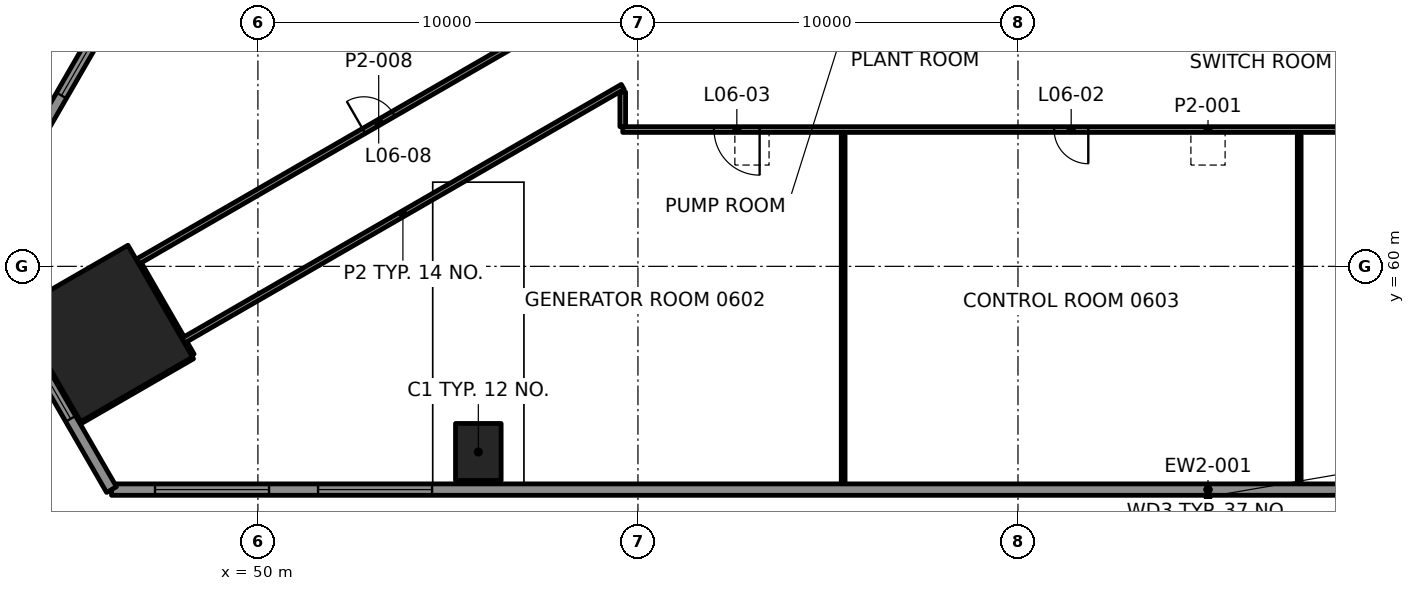
"""IFC4 building model, lengths in metres.
Left out: names, types, materials, properties, quantities, classifications, styles, units other than length and angle.
Written with IfcOpenShell. Run it as: python <this file> out.ifc"""

import sys

from ifc_helpers import new_model, si_unit, direction, frame, frame_2d, origin, origin_2d, place, context, subcontext, project, spatial, rectangle, extrude, element, fill, save


model = new_model("IFC4")
c1 = context("Model", 3, precision=1e-05, world=origin(), true_north=direction((0.0, 1.0)))
c2 = subcontext(c1, "Body", "Model", "MODEL_VIEW")
j1 = project(units=[si_unit("LENGTHUNIT", "METRE"), si_unit("PLANEANGLEUNIT", "RADIAN")], contexts=[c1])
p1 = place(None, origin())
s1 = spatial("IfcSite", under=j1, at=p1, CompositionType="ELEMENT")
p2 = place(p1, origin())
s2 = spatial("IfcBuilding", under=s1, at=p2, CompositionType="ELEMENT")
p3 = place(p2, frame((0.0, 0.0, 31.0)))
s3 = spatial("IfcBuildingStorey", under=s2, at=p3, CompositionType="ELEMENT", Elevation=31.0)
p4 = place(p3, frame((45.959, 58.233, 0.0), z_axis=(0.0, 0.0, 1.0), x_axis=(0.5, -0.866025403784, 0.0)))
e1 = element("IfcColumn", 1, at=p4, inside=s3, PredefinedType="COLUMN", context=c2, shape_type="SweptSolid", body=[
    extrude(rectangle(XDim=3.4, YDim=3.4, at=origin_2d()), origin(), (0.0, 0.0, 1.0), 4.5),
])
p5 = place(p3, frame((55.8, 55.115, -0.0), z_axis=(0.0, 0.0, 1.0), x_axis=(1.0, 0.0, 0.0)))
e2 = element("IfcColumn", 2, at=p5, inside=s3, PredefinedType="COLUMN", context=c2, shape_type="SweptSolid", body=[
    extrude(rectangle(XDim=1.2, YDim=1.5, at=origin_2d()), origin(), (0.0, 0.0, 1.0), 4.5),
])
p6 = place(p3, frame((90.4, 63.6, 0.0), z_axis=(0.0, 0.0, 1.0), x_axis=(-1.0, 0.0, 0.0)))
e3 = element("IfcWall", 3, at=p6, inside=s3, PredefinedType="PARTITIONING", context=c2, shape_type="SweptSolid", body=[
    extrude(rectangle(XDim=30.799, YDim=0.15, at=frame_2d((15.4, 0.0))), origin(), (0.0, 0.0, 1.0), 3.45),
])
p7 = place(p6, frame((6.001, 0.0, 0.0)))
e4 = element("IfcOpeningElement", 4, at=p7, cuts=e3, PredefinedType="OPENING", context=c2, shape_type="SweptSolid", body=[
    extrude(rectangle(XDim=1.2, YDim=2.1, at=frame_2d((0.6, 1.05))), frame((0.0, 0.085, 0.0), z_axis=(0.0, -1.0, 0.0), x_axis=(1.0, 0.0, 0.0)), (0.0, 0.0, 1.0), 0.17),
])
p8 = place(p6, frame((18.55, 0.0, 0.0)))
e5 = element("IfcOpeningElement", 5, at=p8, cuts=e3, PredefinedType="OPENING", context=c2, shape_type="SweptSolid", body=[
    extrude(rectangle(XDim=0.9, YDim=2.1, at=frame_2d((0.45, 1.05))), frame((0.0, 0.085, 0.0), z_axis=(0.0, -1.0, 0.0), x_axis=(1.0, 0.0, 0.0)), (0.0, 0.0, 1.0), 0.17),
])
p9 = place(p6, frame((27.198, 0.0, 0.0)))
e6 = element("IfcOpeningElement", 6, at=p9, cuts=e3, PredefinedType="OPENING", context=c2, shape_type="SweptSolid", body=[
    extrude(rectangle(XDim=1.2, YDim=2.1, at=frame_2d((0.6, 1.05))), frame((0.0, 0.085, 0.0), z_axis=(0.0, -1.0, 0.0), x_axis=(1.0, 0.0, 0.0)), (0.0, 0.0, 1.0), 0.17),
])
p10 = place(p3, frame((45.198, 55.831, 0.0), z_axis=(0.0, 0.0, 1.0), x_axis=(0.866014251095, 0.500019316528, 0.0)))
e7 = element("IfcWall", 7, at=p10, inside=s3, PredefinedType="PARTITIONING", context=c2, shape_type="SweptSolid", body=[
    extrude(rectangle(XDim=3.559, YDim=0.1, at=frame_2d((1.78, 0.0))), origin(), (0.0, 0.0, 1.0), 3.45),
])
p11 = place(p3, frame((48.031, 58.044, 0.0), z_axis=(0.0, 0.0, 1.0), x_axis=(0.866027935033, 0.499995615723, 0.0)))
e8 = element("IfcWall", 8, at=p11, inside=s3, PredefinedType="PARTITIONING", context=c2, shape_type="SweptSolid", body=[
    extrude(rectangle(XDim=13.358, YDim=0.15, at=frame_2d((6.679, 0.0))), origin(), (0.0, 0.0, 1.0), 3.297),
])
p12 = place(p3, frame((46.832, 60.123, 0.0), z_axis=(0.0, 0.0, 1.0), x_axis=(0.866022484069, 0.500005057062, 0.0)))
e9 = element("IfcWall", 9, at=p12, inside=s3, PredefinedType="PARTITIONING", context=c2, shape_type="SweptSolid", body=[
    extrude(rectangle(XDim=14.657, YDim=0.15, at=frame_2d((7.329, 0.0))), origin(), (0.0, 0.0, 1.0), 3.45),
])
p13 = place(p12, frame((6.879, 0.0, 0.0)))
e10 = element("IfcOpeningElement", 10, at=p13, cuts=e9, PredefinedType="OPENING", context=c2, shape_type="SweptSolid", body=[
    extrude(rectangle(XDim=0.9, YDim=2.1, at=frame_2d((0.45, 1.05))), frame((0.0, 0.085, 0.0), z_axis=(0.0, -1.0, 0.0), x_axis=(1.0, 0.0, 0.0)), (0.0, 0.0, 1.0), 0.17),
])
for number, where, z_axis, x_axis in (
    (11, (77.4, 54.155, 0.0), (0.0, 0.0, 1.0), (0.0, 1.0, 0.0)),
    (12, (65.4, 54.155, 0.0), (0.0, 0.0, 1.0), (0.0, 1.0, 0.0)),
):
    element("IfcWall", number, at=place(p3, frame(where, z_axis=z_axis, x_axis=x_axis)), inside=s3, PredefinedType="PARTITIONING", context=c2, shape_type="SweptSolid", body=[
        extrude(rectangle(XDim=9.37, YDim=0.1, at=frame_2d((4.685, 0.0))), origin(), (0.0, 0.0, 1.0), 3.45),
    ])
p14 = place(p3, frame((59.6, 63.676, 0.0), z_axis=(0.0, 0.0, 1.0), x_axis=(0.0, 1.0, 0.0)))
e13 = element("IfcWall", 13, at=p14, inside=s3, PredefinedType="PARTITIONING", context=c2, shape_type="SweptSolid", body=[
    extrude(rectangle(XDim=0.911, YDim=0.15, at=frame_2d((0.456, 0.0))), origin(), (0.0, 0.0, 1.0), 3.45),
])
p15 = place(p3, frame((48.256, 57.655, 0.0), z_axis=(0.0, 0.0, 1.0), x_axis=(-0.499854089722, 0.866109628736, 0.0)))
e14 = element("IfcWall", 14, at=p15, inside=s3, PredefinedType="PARTITIONING", context=c2, shape_type="SweptSolid", body=[
    extrude(rectangle(XDim=0.375, YDim=0.15, at=frame_2d((0.187, 0.0))), origin(), (0.0, 0.0, 1.0), 3.45),
])
p16 = place(p3, frame((47.993, 58.109, 0.0), z_axis=(0.0, 0.0, 1.0), x_axis=(-0.499944821793, 0.866057258594, 0.0)))
e15 = element("IfcWall", 15, at=p16, inside=s3, PredefinedType="PARTITIONING", context=c2, shape_type="SweptSolid", body=[
    extrude(rectangle(XDim=2.249, YDim=0.15, at=frame_2d((1.125, 0.0))), origin(), (0.0, 0.0, 1.0), 3.297),
])
p17 = place(p3, frame((46.148, 54.125, 0.0), z_axis=(0.0, 0.0, 1.0), x_axis=(1.0, 0.0, 0.0)))
e16 = element("IfcWall", 16, at=p17, inside=s3, PredefinedType="SOLIDWALL", context=c2, shape_type="SweptSolid", body=[
    extrude(rectangle(XDim=57.704, YDim=0.3, at=frame_2d((28.852, 0.0))), origin(), (0.0, 0.0, 1.0), 4.05),
])
p18 = place(p17, frame((1.145, 0.0, 0.8)))
e17 = element("IfcOpeningElement", 17, at=p18, cuts=e16, PredefinedType="OPENING", context=c2, shape_type="SweptSolid", body=[
    extrude(rectangle(XDim=3.0, YDim=2.4, at=frame_2d((1.5, 1.2))), frame((0.0, 0.16, 0.0), z_axis=(0.0, -1.0, 0.0), x_axis=(1.0, 0.0, 0.0)), (0.0, 0.0, 1.0), 0.32),
])
p19 = place(p17, frame((5.435, 0.0, 0.8)))
e18 = element("IfcOpeningElement", 18, at=p19, cuts=e16, PredefinedType="OPENING", context=c2, shape_type="SweptSolid", body=[
    extrude(rectangle(XDim=3.0, YDim=2.4, at=frame_2d((1.5, 1.2))), frame((0.0, 0.16, 0.0), z_axis=(0.0, -1.0, 0.0), x_axis=(1.0, 0.0, 0.0)), (0.0, 0.0, 1.0), 0.32),
])
p20 = place(p17, frame((49.269, 0.0, 0.8)))
e19 = element("IfcOpeningElement", 19, at=p20, cuts=e16, PredefinedType="OPENING", context=c2, shape_type="SweptSolid", body=[
    extrude(rectangle(XDim=3.0, YDim=2.4, at=frame_2d((1.5, 1.2))), frame((0.0, 0.16, 0.0), z_axis=(0.0, -1.0, 0.0), x_axis=(1.0, 0.0, 0.0)), (0.0, 0.0, 1.0), 0.32),
])
p21 = place(p17, frame((53.559, 0.0, 0.8)))
e20 = element("IfcOpeningElement", 20, at=p21, cuts=e16, PredefinedType="OPENING", context=c2, shape_type="SweptSolid", body=[
    extrude(rectangle(XDim=3.0, YDim=2.4, at=frame_2d((1.5, 1.2))), frame((0.0, 0.16, 0.0), z_axis=(0.0, -1.0, 0.0), x_axis=(1.0, 0.0, 0.0)), (0.0, 0.0, 1.0), 0.32),
])
p22 = place(p3, frame((71.348, 110.424, 0.0), z_axis=(0.0, 0.0, 1.0), x_axis=(-0.500000550228, -0.86602508611, 0.0)))
e21 = element("IfcWall", 21, at=p22, inside=s3, PredefinedType="SOLIDWALL", context=c2, shape_type="SweptSolid", body=[
    extrude(rectangle(XDim=57.704, YDim=0.3, at=frame_2d((28.852, 0.0))), origin(), (0.0, 0.0, 1.0), 4.05),
])
p23 = place(p22, frame((0.89, 0.0, 0.8)))
e22 = element("IfcOpeningElement", 22, at=p23, cuts=e21, PredefinedType="OPENING", context=c2, shape_type="SweptSolid", body=[
    extrude(rectangle(XDim=3.0, YDim=2.4, at=frame_2d((1.5, 1.2))), frame((0.0, 0.16, 0.0), z_axis=(0.0, -1.0, 0.0), x_axis=(1.0, 0.0, 0.0)), (0.0, 0.0, 1.0), 0.32),
])
p24 = place(p22, frame((4.67, 0.0, 0.8)))
e23 = element("IfcOpeningElement", 23, at=p24, cuts=e21, PredefinedType="OPENING", context=c2, shape_type="SweptSolid", body=[
    extrude(rectangle(XDim=3.0, YDim=2.4, at=frame_2d((1.5, 1.2))), frame((0.0, 0.16, 0.0), z_axis=(0.0, -1.0, 0.0), x_axis=(1.0, 0.0, 0.0)), (0.0, 0.0, 1.0), 0.32),
])
p25 = place(p22, frame((8.451, 0.0, 0.8)))
e24 = element("IfcOpeningElement", 24, at=p25, cuts=e21, PredefinedType="OPENING", context=c2, shape_type="SweptSolid", body=[
    extrude(rectangle(XDim=3.0, YDim=2.4, at=frame_2d((1.5, 1.2))), frame((0.0, 0.16, 0.0), z_axis=(0.0, -1.0, 0.0), x_axis=(1.0, 0.0, 0.0)), (0.0, 0.0, 1.0), 0.32),
])
p26 = place(p22, frame((12.231, 0.0, 0.8)))
e25 = element("IfcOpeningElement", 25, at=p26, cuts=e21, PredefinedType="OPENING", context=c2, shape_type="SweptSolid", body=[
    extrude(rectangle(XDim=3.0, YDim=2.4, at=frame_2d((1.5, 1.2))), frame((0.0, 0.16, 0.0), z_axis=(0.0, -1.0, 0.0), x_axis=(1.0, 0.0, 0.0)), (0.0, 0.0, 1.0), 0.32),
])
p27 = place(p22, frame((16.011, 0.0, 0.8)))
e26 = element("IfcOpeningElement", 26, at=p27, cuts=e21, PredefinedType="OPENING", context=c2, shape_type="SweptSolid", body=[
    extrude(rectangle(XDim=3.0, YDim=2.4, at=frame_2d((1.5, 1.2))), frame((0.0, 0.16, 0.0), z_axis=(0.0, -1.0, 0.0), x_axis=(1.0, 0.0, 0.0)), (0.0, 0.0, 1.0), 0.32),
])
p28 = place(p22, frame((19.792, 0.0, 0.8)))
e27 = element("IfcOpeningElement", 27, at=p28, cuts=e21, PredefinedType="OPENING", context=c2, shape_type="SweptSolid", body=[
    extrude(rectangle(XDim=3.0, YDim=2.4, at=frame_2d((1.5, 1.2))), frame((0.0, 0.16, 0.0), z_axis=(0.0, -1.0, 0.0), x_axis=(1.0, 0.0, 0.0)), (0.0, 0.0, 1.0), 0.32),
])
p29 = place(p22, frame((23.572, 0.0, 0.8)))
e28 = element("IfcOpeningElement", 28, at=p29, cuts=e21, PredefinedType="OPENING", context=c2, shape_type="SweptSolid", body=[
    extrude(rectangle(XDim=3.0, YDim=2.4, at=frame_2d((1.5, 1.2))), frame((0.0, 0.16, 0.0), z_axis=(0.0, -1.0, 0.0), x_axis=(1.0, 0.0, 0.0)), (0.0, 0.0, 1.0), 0.32),
])
p30 = place(p22, frame((27.352, 0.0, 0.8)))
e29 = element("IfcOpeningElement", 29, at=p30, cuts=e21, PredefinedType="OPENING", context=c2, shape_type="SweptSolid", body=[
    extrude(rectangle(XDim=3.0, YDim=2.4, at=frame_2d((1.5, 1.2))), frame((0.0, 0.16, 0.0), z_axis=(0.0, -1.0, 0.0), x_axis=(1.0, 0.0, 0.0)), (0.0, 0.0, 1.0), 0.32),
])
p31 = place(p22, frame((31.132, 0.0, 0.8)))
e30 = element("IfcOpeningElement", 30, at=p31, cuts=e21, PredefinedType="OPENING", context=c2, shape_type="SweptSolid", body=[
    extrude(rectangle(XDim=3.0, YDim=2.4, at=frame_2d((1.5, 1.2))), frame((0.0, 0.16, 0.0), z_axis=(0.0, -1.0, 0.0), x_axis=(1.0, 0.0, 0.0)), (0.0, 0.0, 1.0), 0.32),
])
p32 = place(p22, frame((34.913, 0.0, 0.8)))
e31 = element("IfcOpeningElement", 31, at=p32, cuts=e21, PredefinedType="OPENING", context=c2, shape_type="SweptSolid", body=[
    extrude(rectangle(XDim=3.0, YDim=2.4, at=frame_2d((1.5, 1.2))), frame((0.0, 0.16, 0.0), z_axis=(0.0, -1.0, 0.0), x_axis=(1.0, 0.0, 0.0)), (0.0, 0.0, 1.0), 0.32),
])
p33 = place(p22, frame((38.693, 0.0, 0.8)))
e32 = element("IfcOpeningElement", 32, at=p33, cuts=e21, PredefinedType="OPENING", context=c2, shape_type="SweptSolid", body=[
    extrude(rectangle(XDim=3.0, YDim=2.4, at=frame_2d((1.5, 1.2))), frame((0.0, 0.16, 0.0), z_axis=(0.0, -1.0, 0.0), x_axis=(1.0, 0.0, 0.0)), (0.0, 0.0, 1.0), 0.32),
])
p34 = place(p22, frame((42.473, 0.0, 0.8)))
e33 = element("IfcOpeningElement", 33, at=p34, cuts=e21, PredefinedType="OPENING", context=c2, shape_type="SweptSolid", body=[
    extrude(rectangle(XDim=3.0, YDim=2.4, at=frame_2d((1.5, 1.2))), frame((0.0, 0.16, 0.0), z_axis=(0.0, -1.0, 0.0), x_axis=(1.0, 0.0, 0.0)), (0.0, 0.0, 1.0), 0.32),
])
p35 = place(p22, frame((46.253, 0.0, 0.8)))
e34 = element("IfcOpeningElement", 34, at=p35, cuts=e21, PredefinedType="OPENING", context=c2, shape_type="SweptSolid", body=[
    extrude(rectangle(XDim=3.0, YDim=2.4, at=frame_2d((1.5, 1.2))), frame((0.0, 0.16, 0.0), z_axis=(0.0, -1.0, 0.0), x_axis=(1.0, 0.0, 0.0)), (0.0, 0.0, 1.0), 0.32),
])
p36 = place(p22, frame((50.033, 0.0, 0.8)))
e35 = element("IfcOpeningElement", 35, at=p36, cuts=e21, PredefinedType="OPENING", context=c2, shape_type="SweptSolid", body=[
    extrude(rectangle(XDim=3.0, YDim=2.4, at=frame_2d((1.5, 1.2))), frame((0.0, 0.16, 0.0), z_axis=(0.0, -1.0, 0.0), x_axis=(1.0, 0.0, 0.0)), (0.0, 0.0, 1.0), 0.32),
])
p37 = place(p22, frame((53.814, 0.0, 0.8)))
e36 = element("IfcOpeningElement", 36, at=p37, cuts=e21, PredefinedType="OPENING", context=c2, shape_type="SweptSolid", body=[
    extrude(rectangle(XDim=3.0, YDim=2.4, at=frame_2d((1.5, 1.2))), frame((0.0, 0.16, 0.0), z_axis=(0.0, -1.0, 0.0), x_axis=(1.0, 0.0, 0.0)), (0.0, 0.0, 1.0), 0.32),
])
p38 = place(p3, frame((42.496, 60.451, 0.0), z_axis=(0.0, 0.0, 1.0), x_axis=(0.500000231294, -0.866025270247, 0.0)))
e37 = element("IfcWall", 37, at=p38, inside=s3, PredefinedType="SOLIDWALL", context=c2, shape_type="SweptSolid", body=[
    extrude(rectangle(XDim=7.304, YDim=0.3, at=frame_2d((3.652, 0.0))), origin(), (0.0, 0.0, 1.0), 4.05),
])
p39 = place(p38, frame((2.152, 0.0, 0.8)))
e38 = element("IfcOpeningElement", 38, at=p39, cuts=e37, PredefinedType="OPENING", context=c2, shape_type="SweptSolid", body=[
    extrude(rectangle(XDim=3.0, YDim=2.4, at=frame_2d((1.5, 1.2))), frame((0.0, 0.16, 0.0), z_axis=(0.0, -1.0, 0.0), x_axis=(1.0, 0.0, 0.0)), (0.0, 0.0, 1.0), 0.32),
])
p40 = place(p8, origin())
e39 = element("IfcDoor", 39, at=p40, inside=s3, OperationType="SINGLE_SWING_LEFT", PredefinedType="DOOR", context=c2, shape_type="SweptSolid", body=[
    extrude(rectangle(XDim=0.9, YDim=2.1, at=frame_2d((0.45, 1.05))), frame((0.0, 0.025, 0.0), z_axis=(0.0, -1.0, 0.0), x_axis=(1.0, 0.0, 0.0)), (0.0, 0.0, 1.0), 0.05),
])
fill(e5, e39)
p41 = place(p9, origin())
e40 = element("IfcDoor", 40, at=p41, inside=s3, OperationType="DOUBLE_DOOR_SINGLE_SWING", PredefinedType="DOOR", context=c2, shape_type="SweptSolid", body=[
    extrude(rectangle(XDim=1.2, YDim=2.1, at=frame_2d((0.6, 1.05))), frame((0.0, 0.025, 0.0), z_axis=(0.0, -1.0, 0.0), x_axis=(1.0, 0.0, 0.0)), (0.0, 0.0, 1.0), 0.05),
])
fill(e6, e40)
p42 = place(p13, origin())
e41 = element("IfcDoor", 41, at=p42, inside=s3, OperationType="SINGLE_SWING_RIGHT", PredefinedType="DOOR", context=c2, shape_type="SweptSolid", body=[
    extrude(rectangle(XDim=0.9, YDim=2.1, at=frame_2d((0.45, 1.05))), frame((0.0, 0.025, 0.0), z_axis=(0.0, -1.0, 0.0), x_axis=(1.0, 0.0, 0.0)), (0.0, 0.0, 1.0), 0.05),
])
fill(e10, e41)
p43 = place(p18, origin())
e42 = element("IfcWindow", 42, at=p43, inside=s3, PartitioningType="SINGLE_PANEL", PredefinedType="WINDOW", context=c2, shape_type="SweptSolid", body=[
    extrude(rectangle(XDim=3.0, YDim=2.4, at=frame_2d((1.5, 1.2))), frame((0.0, 0.03, 0.0), z_axis=(0.0, -1.0, 0.0), x_axis=(1.0, 0.0, 0.0)), (0.0, 0.0, 1.0), 0.06),
])
fill(e17, e42)
p44 = place(p19, origin())
e43 = element("IfcWindow", 43, at=p44, inside=s3, PartitioningType="SINGLE_PANEL", PredefinedType="WINDOW", context=c2, shape_type="SweptSolid", body=[
    extrude(rectangle(XDim=3.0, YDim=2.4, at=frame_2d((1.5, 1.2))), frame((0.0, 0.03, 0.0), z_axis=(0.0, -1.0, 0.0), x_axis=(1.0, 0.0, 0.0)), (0.0, 0.0, 1.0), 0.06),
])
fill(e18, e43)
p45 = place(p36, origin())
e44 = element("IfcWindow", 44, at=p45, inside=s3, PartitioningType="SINGLE_PANEL", PredefinedType="WINDOW", context=c2, shape_type="SweptSolid", body=[
    extrude(rectangle(XDim=3.0, YDim=2.4, at=frame_2d((1.5, 1.2))), frame((0.0, 0.03, 0.0), z_axis=(0.0, -1.0, 0.0), x_axis=(1.0, 0.0, 0.0)), (0.0, 0.0, 1.0), 0.06),
])
fill(e35, e44)
p46 = place(p39, origin())
e45 = element("IfcWindow", 45, at=p46, inside=s3, PartitioningType="SINGLE_PANEL", PredefinedType="WINDOW", context=c2, shape_type="SweptSolid", body=[
    extrude(rectangle(XDim=3.0, YDim=2.4, at=frame_2d((1.5, 1.2))), frame((0.0, 0.03, 0.0), z_axis=(0.0, -1.0, 0.0), x_axis=(1.0, 0.0, 0.0)), (0.0, 0.0, 1.0), 0.06),
])
fill(e38, e45)
save(model, sys.argv[1])
